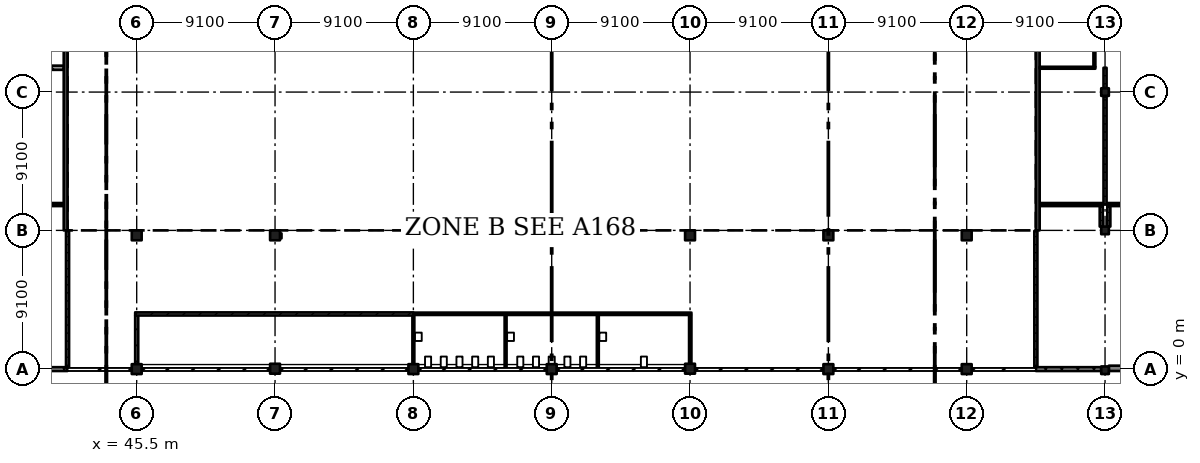
"""IFC4 building model, lengths in metres.
Left out: names, types, materials, properties, quantities, classifications, styles, units other than length and angle.
Written with IfcOpenShell. Run it as: python <this file> out.ifc"""

import sys

from ifc_helpers import new_model, si_unit, direction, frame, frame_2d, origin, origin_2d, place, context, subcontext, project, spatial, rectangle, extrude, element, fill, save


model = new_model("IFC4")
c1 = context("Model", 3, precision=1e-05, world=origin(), true_north=direction((0.0, 1.0)))
c2 = subcontext(c1, "Body", "Model", "MODEL_VIEW")
j1 = project(units=[si_unit("LENGTHUNIT", "METRE"), si_unit("PLANEANGLEUNIT", "RADIAN")], contexts=[c1])
p1 = place(None, origin())
s1 = spatial("IfcSite", under=j1, at=p1, CompositionType="ELEMENT")
p2 = place(p1, origin())
s2 = spatial("IfcBuilding", under=s1, at=p2, CompositionType="ELEMENT")
p3 = place(p2, frame((0.0, 0.0, 24.57)))
s3 = spatial("IfcBuildingStorey", under=s2, at=p3, CompositionType="ELEMENT", Elevation=24.57)
for number, where, z_axis, x_axis in (
    (1, (45.5, -0.025, 0.0), (0.0, 0.0, 1.0), (1.0, 0.0, 0.0)),
    (2, (45.5, 8.775, 0.0), (0.0, 0.0, 1.0), (1.0, 0.0, 0.0)),
    (3, (54.6, 0.0, 0.0), (0.0, 0.0, 1.0), (1.0, 0.0, 0.0)),
    (4, (54.6, 8.775, 0.0), (0.0, 0.0, 1.0), (1.0, 0.0, 0.0)),
    (5, (63.7, -0.025, 0.0), (0.0, 0.0, 1.0), (1.0, 0.0, 0.0)),
    (6, (63.7, 8.775, 0.0), (0.0, 0.0, 1.0), (1.0, 0.0, 0.0)),
    (7, (72.8, -0.025, 0.0), (0.0, 0.0, 1.0), (1.0, 0.0, 0.0)),
    (8, (72.8, 8.775, 0.0), (0.0, 0.0, 1.0), (1.0, 0.0, 0.0)),
    (9, (81.9, 0.0, 0.0), (0.0, 0.0, 1.0), (1.0, 0.0, 0.0)),
    (10, (81.9, 8.775, 0.0), (0.0, 0.0, 1.0), (1.0, 0.0, 0.0)),
    (11, (91.0, -0.025, 0.0), (0.0, 0.0, 1.0), (1.0, 0.0, 0.0)),
    (12, (91.0, 8.775, 0.0), (0.0, 0.0, 1.0), (1.0, 0.0, 0.0)),
    (13, (100.1, -0.025, 0.0), (0.0, 0.0, 1.0), (1.0, 0.0, 0.0)),
    (14, (100.1, 8.775, 0.0), (0.0, 0.0, 1.0), (1.0, 0.0, 0.0)),
):
    element("IfcColumn", number, at=place(p3, frame(where, z_axis=z_axis, x_axis=x_axis)), inside=s3, PredefinedType="COLUMN", context=c2, shape_type="SweptSolid", body=[
        extrude(rectangle(XDim=0.65, YDim=0.65, at=origin_2d()), origin(), (0.0, 0.0, 1.0), 4.55),
    ])
for number, where, z_axis, x_axis in (
    (15, (109.2, -0.1, 0.0), (0.0, 0.0, 1.0), (1.0, 0.0, 0.0)),
    (16, (109.2, 9.1, 0.0), (0.0, 0.0, 1.0), (1.0, 0.0, 0.0)),
    (17, (109.2, 18.2, 0.0), (0.0, 0.0, 1.0), (1.0, 0.0, 0.0)),
):
    element("IfcColumn", number, at=place(p3, frame(where, z_axis=z_axis, x_axis=x_axis)), inside=s3, PredefinedType="COLUMN", context=c2, shape_type="SweptSolid", body=[
        extrude(rectangle(XDim=0.5, YDim=0.5, at=origin_2d()), origin(), (0.0, 0.0, 1.0), 4.55),
    ])
for number, where, z_axis, x_axis in (
    (18, (40.825, 40.95, 0.0), (0.0, 0.0, 1.0), (0.0, -1.0, 0.0)),
    (19, (104.775, 40.95, 0.0), (0.0, 0.0, 1.0), (0.0, -1.0, 0.0)),
):
    element("IfcWall", number, at=place(p3, frame(where, z_axis=z_axis, x_axis=x_axis)), inside=s3, PredefinedType="SHEAR", context=c2, shape_type="SweptSolid", body=[
        extrude(rectangle(XDim=31.85, YDim=0.25, at=frame_2d((15.925, 0.0))), origin(), (0.0, 0.0, 1.0), 4.55),
    ])
for number, where, z_axis, x_axis in (
    (20, (36.65, -0.025, 0.0), (0.0, 0.0, 1.0), (1.0, 0.0, 0.0)),
    (21, (104.65, -0.025, 0.0), (0.0, 0.0, 1.0), (1.0, 0.0, 0.0)),
):
    element("IfcWall", number, at=place(p3, frame(where, z_axis=z_axis, x_axis=x_axis)), inside=s3, PredefinedType="SOLIDWALL", context=c2, shape_type="SweptSolid", body=[
        extrude(rectangle(XDim=4.3, YDim=0.25, at=frame_2d((2.15, 0.0))), origin(), (0.0, 0.0, 1.0), 3.6),
    ])
p4 = place(p3, frame((109.45, 0.025, 0.0), z_axis=(0.0, 0.0, 1.0), x_axis=(1.0, 0.0, 0.0)))
e22 = element("IfcWall", 22, at=p4, inside=s3, PredefinedType="SOLIDWALL", context=c2, shape_type="SweptSolid", body=[
    extrude(rectangle(XDim=8.6, YDim=0.35, at=frame_2d((4.3, 0.0))), origin(), (0.0, 0.0, 1.0), 3.6),
])
p5 = place(p3, frame((36.962, 19.8, 0.0), z_axis=(0.0, 0.0, 1.0), x_axis=(1.0, 0.0, 0.0)))
e23 = element("IfcWall", 23, at=p5, inside=s3, PredefinedType="SOLIDWALL", context=c2, shape_type="SweptSolid", body=[
    extrude(rectangle(XDim=3.738, YDim=0.275, at=frame_2d((1.869, 0.0))), origin(), (0.0, 0.0, 1.0), 4.35),
])
p6 = place(p5, frame((1.25, 0.0, 0.0)))
e24 = element("IfcOpeningElement", 24, at=p6, cuts=e23, PredefinedType="OPENING", context=c2, shape_type="SweptSolid", body=[
    extrude(rectangle(XDim=1.2, YDim=2.4, at=frame_2d((0.6, 1.2))), frame((0.0, 0.147, 0.0), z_axis=(0.0, -1.0, 0.0), x_axis=(1.0, 0.0, 0.0)), (0.0, 0.0, 1.0), 0.295),
])
p7 = place(p3, frame((40.7, 10.8, 0.0), z_axis=(0.0, 0.0, 1.0), x_axis=(-1.0, 0.0, 0.0)))
e25 = element("IfcWall", 25, at=p7, inside=s3, PredefinedType="PARTITIONING", context=c2, shape_type="SweptSolid", body=[
    extrude(rectangle(XDim=4.15, YDim=0.2, at=frame_2d((2.075, 0.0))), origin(), (0.0, 0.0, 1.0), 4.35),
])
p8 = place(p7, frame((1.15, 0.0, 0.0)))
e26 = element("IfcOpeningElement", 26, at=p8, cuts=e25, PredefinedType="OPENING", context=c2, shape_type="SweptSolid", body=[
    extrude(rectangle(XDim=1.8, YDim=2.4, at=frame_2d((0.9, 1.2))), frame((0.0, 0.11, 0.0), z_axis=(0.0, -1.0, 0.0), x_axis=(1.0, 0.0, 0.0)), (0.0, 0.0, 1.0), 0.22),
])
p9 = place(p3, frame((40.95, 0.1, 0.0), z_axis=(0.0, 0.0, 1.0), x_axis=(0.0, 1.0, 0.0)))
e27 = element("IfcWall", 27, at=p9, inside=s3, PredefinedType="PARTITIONING", context=c2, shape_type="SweptSolid", body=[
    extrude(rectangle(XDim=8.97, YDim=0.2, at=frame_2d((4.485, 0.0))), origin(), (0.0, 0.0, 1.0), 3.55),
])
p10 = place(p9, frame((5.02, 0.0, 0.0)))
e28 = element("IfcOpeningElement", 28, at=p10, cuts=e27, PredefinedType="OPENING", context=c2, shape_type="SweptSolid", body=[
    extrude(rectangle(XDim=2.4, YDim=2.4, at=frame_2d((1.2, 1.2))), frame((0.0, 0.11, 0.0), z_axis=(0.0, -1.0, 0.0), x_axis=(1.0, 0.0, 0.0)), (0.0, 0.0, 1.0), 0.22),
])
p11 = place(p9, frame((0.85, 0.0, 0.0)))
e29 = element("IfcOpeningElement", 29, at=p11, cuts=e27, PredefinedType="OPENING", context=c2, shape_type="SweptSolid", body=[
    extrude(rectangle(XDim=2.4, YDim=2.4, at=frame_2d((1.2, 1.2))), frame((0.0, 0.11, 0.0), z_axis=(0.0, -1.0, 0.0), x_axis=(1.0, 0.0, 0.0)), (0.0, 0.0, 1.0), 0.22),
])
p12 = place(p3, frame((45.5, 3.5, 0.0), z_axis=(0.0, 0.0, 1.0), x_axis=(0.0, -1.0, 0.0)))
e30 = element("IfcWall", 30, at=p12, inside=s3, PredefinedType="PARTITIONING", context=c2, shape_type="SweptSolid", body=[
    extrude(rectangle(XDim=3.2, YDim=0.2, at=frame_2d((1.6, 0.0))), origin(), (0.0, 0.0, 1.0), 3.9),
])
for number, where, z_axis, x_axis in (
    (31, (54.925, 8.575, 0.0), (0.0, 0.0, 1.0), (0.0, 1.0, 0.0)),
    (32, (63.375, 8.875, 0.0), (0.0, 0.0, 1.0), (0.0, -1.0, 0.0)),
):
    element("IfcWall", number, at=place(p3, frame(where, z_axis=z_axis, x_axis=x_axis)), inside=s3, PredefinedType="PARTITIONING", context=c2, shape_type="SweptSolid", body=[
        extrude(rectangle(XDim=0.325, YDim=0.2, at=frame_2d((0.163, 0.0))), origin(), (0.0, 0.0, 1.0), 8.43),
    ])
p13 = place(p3, frame((63.7, 3.5, 0.0), z_axis=(0.0, 0.0, 1.0), x_axis=(0.0, -1.0, 0.0)))
e33 = element("IfcWall", 33, at=p13, inside=s3, PredefinedType="PARTITIONING", context=c2, shape_type="SweptSolid", body=[
    extrude(rectangle(XDim=3.2, YDim=0.125, at=frame_2d((1.6, 0.0))), origin(), (0.0, 0.0, 1.0), 3.9),
])
p14 = place(p3, frame((63.7, 3.6, 0.0), z_axis=(0.0, 0.0, 1.0), x_axis=(-1.0, 0.0, 0.0)))
e34 = element("IfcWall", 34, at=p14, inside=s3, PredefinedType="PARTITIONING", context=c2, shape_type="SweptSolid", body=[
    extrude(rectangle(XDim=18.3, YDim=0.2, at=frame_2d((9.15, 0.0))), origin(), (0.0, 0.0, 1.0), 3.9),
])
p15 = place(p14, frame((8.25, 0.0, 0.0)))
e35 = element("IfcOpeningElement", 35, at=p15, cuts=e34, PredefinedType="OPENING", context=c2, shape_type="SweptSolid", body=[
    extrude(rectangle(XDim=1.8, YDim=2.1, at=frame_2d((0.9, 1.05))), frame((0.0, 0.11, 0.0), z_axis=(0.0, -1.0, 0.0), x_axis=(1.0, 0.0, 0.0)), (0.0, 0.0, 1.0), 0.22),
])
p16 = place(p3, frame((69.767, 3.538, 0.0), z_axis=(0.0, 0.0, 1.0), x_axis=(0.0, -1.0, 0.0)))
e36 = element("IfcWall", 36, at=p16, inside=s3, PredefinedType="PARTITIONING", context=c2, shape_type="SweptSolid", body=[
    extrude(rectangle(XDim=3.508, YDim=0.125, at=frame_2d((1.754, 0.0))), origin(), (0.0, 0.0, 1.0), 3.9),
])
p17 = place(p3, frame((63.7, 3.6, 0.0), z_axis=(0.0, 0.0, 1.0), x_axis=(1.0, 0.0, 0.0)))
e37 = element("IfcWall", 37, at=p17, inside=s3, PredefinedType="PARTITIONING", context=c2, shape_type="SweptSolid", body=[
    extrude(rectangle(XDim=18.262, YDim=0.125, at=frame_2d((9.131, 0.0))), origin(), (0.0, 0.0, 1.0), 3.9),
])
p18 = place(p17, frame((2.617, 0.0, 0.0)))
e38 = element("IfcOpeningElement", 38, at=p18, cuts=e37, PredefinedType="OPENING", context=c2, shape_type="SweptSolid", body=[
    extrude(rectangle(XDim=0.9, YDim=2.1, at=frame_2d((0.45, 1.05))), frame((0.0, 0.073, 0.0), z_axis=(0.0, -1.0, 0.0), x_axis=(1.0, 0.0, 0.0)), (0.0, 0.0, 1.0), 0.145),
])
p19 = place(p17, frame((8.683, 0.0, 0.0)))
e39 = element("IfcOpeningElement", 39, at=p19, cuts=e37, PredefinedType="OPENING", context=c2, shape_type="SweptSolid", body=[
    extrude(rectangle(XDim=0.9, YDim=2.1, at=frame_2d((0.45, 1.05))), frame((0.0, 0.073, 0.0), z_axis=(0.0, -1.0, 0.0), x_axis=(1.0, 0.0, 0.0)), (0.0, 0.0, 1.0), 0.145),
])
p20 = place(p17, frame((14.712, 0.0, 0.0)))
e40 = element("IfcOpeningElement", 40, at=p20, cuts=e37, PredefinedType="OPENING", context=c2, shape_type="SweptSolid", body=[
    extrude(rectangle(XDim=1.0, YDim=2.1, at=frame_2d((0.5, 1.05))), frame((0.0, 0.073, 0.0), z_axis=(0.0, -1.0, 0.0), x_axis=(1.0, 0.0, 0.0)), (0.0, 0.0, 1.0), 0.145),
])
p21 = place(p3, frame((75.833, 3.538, 0.0), z_axis=(0.0, 0.0, 1.0), x_axis=(0.0, -1.0, 0.0)))
e41 = element("IfcWall", 41, at=p21, inside=s3, PredefinedType="PARTITIONING", context=c2, shape_type="SweptSolid", body=[
    extrude(rectangle(XDim=3.508, YDim=0.125, at=frame_2d((1.754, 0.0))), origin(), (0.0, 0.0, 1.0), 3.9),
])
p22 = place(p3, frame((81.9, 0.325, 0.0), z_axis=(0.0, 0.0, 1.0), x_axis=(0.0, 1.0, 0.0)))
e42 = element("IfcWall", 42, at=p22, inside=s3, PredefinedType="PARTITIONING", context=c2, shape_type="SweptSolid", body=[
    extrude(rectangle(XDim=3.213, YDim=0.125, at=frame_2d((1.606, 0.0))), origin(), (0.0, 0.0, 1.0), 3.9),
])
p23 = place(p3, frame((104.65, 0.1, 0.0), z_axis=(0.0, 0.0, 1.0), x_axis=(0.0, 1.0, 0.0)))
e43 = element("IfcWall", 43, at=p23, inside=s3, PredefinedType="PARTITIONING", context=c2, shape_type="SweptSolid", body=[
    extrude(rectangle(XDim=8.97, YDim=0.2, at=frame_2d((4.485, 0.0))), origin(), (0.0, 0.0, 1.0), 3.55),
])
p24 = place(p23, frame((5.05, 0.0, 0.0)))
e44 = element("IfcOpeningElement", 44, at=p24, cuts=e43, PredefinedType="OPENING", context=c2, shape_type="SweptSolid", body=[
    extrude(rectangle(XDim=2.4, YDim=2.4, at=frame_2d((1.2, 1.2))), frame((0.0, 0.11, 0.0), z_axis=(0.0, -1.0, 0.0), x_axis=(1.0, 0.0, 0.0)), (0.0, 0.0, 1.0), 0.22),
])
p25 = place(p23, frame((0.85, 0.0, 0.0)))
e45 = element("IfcOpeningElement", 45, at=p25, cuts=e43, PredefinedType="OPENING", context=c2, shape_type="SweptSolid", body=[
    extrude(rectangle(XDim=2.4, YDim=2.4, at=frame_2d((1.2, 1.2))), frame((0.0, 0.11, 0.0), z_axis=(0.0, -1.0, 0.0), x_axis=(1.0, 0.0, 0.0)), (0.0, 0.0, 1.0), 0.22),
])
p26 = place(p3, frame((104.9, 19.8, 0.0), z_axis=(0.0, 0.0, 1.0), x_axis=(1.0, 0.0, 0.0)))
e46 = element("IfcWall", 46, at=p26, inside=s3, PredefinedType="PARTITIONING", context=c2, shape_type="SweptSolid", body=[
    extrude(rectangle(XDim=3.663, YDim=0.125, at=frame_2d((1.831, 0.0))), origin(), (0.0, 0.0, 1.0), 4.35),
])
p27 = place(p26, frame((1.35, 0.0, 0.0)))
e47 = element("IfcOpeningElement", 47, at=p27, cuts=e46, PredefinedType="OPENING", context=c2, shape_type="SweptSolid", body=[
    extrude(rectangle(XDim=0.9, YDim=2.1, at=frame_2d((0.45, 1.05))), frame((0.0, 0.073, 0.0), z_axis=(0.0, -1.0, 0.0), x_axis=(1.0, 0.0, 0.0)), (0.0, 0.0, 1.0), 0.145),
])
p28 = place(p3, frame((108.5, 19.863, 0.0), z_axis=(0.0, 0.0, 1.0), x_axis=(0.0, 1.0, 0.0)))
e48 = element("IfcWall", 48, at=p28, inside=s3, PredefinedType="PARTITIONING", context=c2, shape_type="SweptSolid", body=[
    extrude(rectangle(XDim=7.125, YDim=0.125, at=frame_2d((3.562, 0.0))), origin(), (0.0, 0.0, 1.0), 4.35),
])
p29 = place(p3, frame((108.95, 9.35, 0.0), z_axis=(0.0, 0.0, 1.0), x_axis=(0.0, 1.0, 0.0)))
e49 = element("IfcWall", 49, at=p29, inside=s3, PredefinedType="PARTITIONING", context=c2, shape_type="SweptSolid", body=[
    extrude(rectangle(XDim=1.35, YDim=0.2, at=frame_2d((0.675, 0.0))), origin(), (0.0, 0.0, 1.0), 4.35),
])
p30 = place(p3, frame((109.05, 10.8, 0.0), z_axis=(0.0, 0.0, 1.0), x_axis=(-1.0, 0.0, 0.0)))
e50 = element("IfcWall", 50, at=p30, inside=s3, PredefinedType="PARTITIONING", context=c2, shape_type="SweptSolid", body=[
    extrude(rectangle(XDim=4.15, YDim=0.2, at=frame_2d((2.075, 0.0))), origin(), (0.0, 0.0, 1.0), 4.35),
])
p31 = place(p30, frame((1.15, 0.0, 0.0)))
e51 = element("IfcOpeningElement", 51, at=p31, cuts=e50, PredefinedType="OPENING", context=c2, shape_type="SweptSolid", body=[
    extrude(rectangle(XDim=1.8, YDim=2.4, at=frame_2d((0.9, 1.2))), frame((0.0, 0.11, 0.0), z_axis=(0.0, -1.0, 0.0), x_axis=(1.0, 0.0, 0.0)), (0.0, 0.0, 1.0), 0.22),
])
p32 = place(p3, frame((109.2, 10.8, 0.0), z_axis=(0.0, 0.0, 1.0), x_axis=(0.0, 1.0, 0.0)))
e52 = element("IfcWall", 52, at=p32, inside=s3, PredefinedType="PARTITIONING", context=c2, shape_type="SweptSolid", body=[
    extrude(rectangle(XDim=7.15, YDim=0.2, at=frame_2d((3.575, 0.0))), origin(), (0.0, 0.0, 1.0), 3.6),
])
p33 = place(p32, frame((0.85, 0.0, 0.0)))
e53 = element("IfcOpeningElement", 53, at=p33, cuts=e52, PredefinedType="OPENING", context=c2, shape_type="SweptSolid", body=[
    extrude(rectangle(XDim=1.8, YDim=2.4, at=frame_2d((0.9, 1.2))), frame((0.0, 0.11, 0.0), z_axis=(0.0, -1.0, 0.0), x_axis=(1.0, 0.0, 0.0)), (0.0, 0.0, 1.0), 0.22),
])
p34 = place(p32, frame((4.45, 0.0, 0.0)))
e54 = element("IfcOpeningElement", 54, at=p34, cuts=e52, PredefinedType="OPENING", context=c2, shape_type="SweptSolid", body=[
    extrude(rectangle(XDim=1.8, YDim=2.4, at=frame_2d((0.9, 1.2))), frame((0.0, 0.11, 0.0), z_axis=(0.0, -1.0, 0.0), x_axis=(1.0, 0.0, 0.0)), (0.0, 0.0, 1.0), 0.22),
])
p35 = place(p3, frame((109.2, 18.45, 0.0), z_axis=(0.0, 0.0, 1.0), x_axis=(0.0, 1.0, 0.0)))
e55 = element("IfcWall", 55, at=p35, inside=s3, PredefinedType="PARTITIONING", context=c2, shape_type="SweptSolid", body=[
    extrude(rectangle(XDim=1.35, YDim=0.2, at=frame_2d((0.675, 0.0))), origin(), (0.0, 0.0, 1.0), 3.6),
])
p36 = place(p3, frame((109.45, 10.7, 0.0), z_axis=(0.0, 0.0, 1.0), x_axis=(0.0, -1.0, 0.0)))
e56 = element("IfcWall", 56, at=p36, inside=s3, PredefinedType="PARTITIONING", context=c2, shape_type="SweptSolid", body=[
    extrude(rectangle(XDim=1.35, YDim=0.2, at=frame_2d((0.675, 0.0))), origin(), (0.0, 0.0, 1.0), 4.35),
])
p37 = place(p3, frame((112.17, 10.8, 0.0), z_axis=(0.0, 0.0, 1.0), x_axis=(-1.0, 0.0, 0.0)))
e57 = element("IfcWall", 57, at=p37, inside=s3, PredefinedType="PARTITIONING", context=c2, shape_type="SweptSolid", body=[
    extrude(rectangle(XDim=2.82, YDim=0.2, at=frame_2d((1.41, 0.0))), origin(), (0.0, 0.0, 1.0), 4.35),
])
p38 = place(p37, frame((0.55, 0.0, 0.0)))
e58 = element("IfcOpeningElement", 58, at=p38, cuts=e57, PredefinedType="OPENING", context=c2, shape_type="SweptSolid", body=[
    extrude(rectangle(XDim=1.8, YDim=2.4, at=frame_2d((0.9, 1.2))), frame((0.0, 0.11, 0.0), z_axis=(0.0, -1.0, 0.0), x_axis=(1.0, 0.0, 0.0)), (0.0, 0.0, 1.0), 0.22),
])
p39 = place(p27, origin())
e59 = element("IfcDoor", 59, at=p39, inside=s3, OperationType="SINGLE_SWING_RIGHT", PredefinedType="DOOR", context=c2, shape_type="SweptSolid", body=[
    extrude(rectangle(XDim=0.9, YDim=2.1, at=frame_2d((0.45, 1.05))), frame((0.0, 0.025, 0.0), z_axis=(0.0, -1.0, 0.0), x_axis=(1.0, 0.0, 0.0)), (0.0, 0.0, 1.0), 0.05),
])
fill(e47, e59)
p40 = place(p15, origin())
e60 = element("IfcDoor", 60, at=p40, inside=s3, OperationType="DOUBLE_DOOR_SINGLE_SWING", PredefinedType="DOOR", context=c2, shape_type="SweptSolid", body=[
    extrude(rectangle(XDim=1.8, YDim=2.1, at=frame_2d((0.9, 1.05))), frame((0.0, 0.025, 0.0), z_axis=(0.0, -1.0, 0.0), x_axis=(1.0, 0.0, 0.0)), (0.0, 0.0, 1.0), 0.05),
])
fill(e35, e60)
p41 = place(p18, origin())
e61 = element("IfcDoor", 61, at=p41, inside=s3, OperationType="SINGLE_SWING_RIGHT", PredefinedType="DOOR", context=c2, shape_type="SweptSolid", body=[
    extrude(rectangle(XDim=0.9, YDim=2.1, at=frame_2d((0.45, 1.05))), frame((0.0, 0.025, 0.0), z_axis=(0.0, -1.0, 0.0), x_axis=(1.0, 0.0, 0.0)), (0.0, 0.0, 1.0), 0.05),
])
fill(e38, e61)
p42 = place(p19, origin())
e62 = element("IfcDoor", 62, at=p42, inside=s3, OperationType="SINGLE_SWING_RIGHT", PredefinedType="DOOR", context=c2, shape_type="SweptSolid", body=[
    extrude(rectangle(XDim=0.9, YDim=2.1, at=frame_2d((0.45, 1.05))), frame((0.0, 0.025, 0.0), z_axis=(0.0, -1.0, 0.0), x_axis=(1.0, 0.0, 0.0)), (0.0, 0.0, 1.0), 0.05),
])
fill(e39, e62)
p43 = place(p20, origin())
e63 = element("IfcDoor", 63, at=p43, inside=s3, OperationType="SINGLE_SWING_RIGHT", PredefinedType="DOOR", context=c2, shape_type="SweptSolid", body=[
    extrude(rectangle(XDim=1.0, YDim=2.1, at=frame_2d((0.5, 1.05))), frame((0.0, 0.025, 0.0), z_axis=(0.0, -1.0, 0.0), x_axis=(1.0, 0.0, 0.0)), (0.0, 0.0, 1.0), 0.05),
])
fill(e40, e63)
p44 = place(p10, origin())
e64 = element("IfcDoor", 64, at=p44, inside=s3, OperationType="DOUBLE_DOOR_SINGLE_SWING", PredefinedType="DOOR", context=c2, shape_type="SweptSolid", body=[
    extrude(rectangle(XDim=2.4, YDim=2.4, at=frame_2d((1.2, 1.2))), frame((0.0, 0.025, 0.0), z_axis=(0.0, -1.0, 0.0), x_axis=(1.0, 0.0, 0.0)), (0.0, 0.0, 1.0), 0.05),
])
fill(e28, e64)
p45 = place(p11, origin())
e65 = element("IfcDoor", 65, at=p45, inside=s3, OperationType="DOUBLE_DOOR_SINGLE_SWING", PredefinedType="DOOR", context=c2, shape_type="SweptSolid", body=[
    extrude(rectangle(XDim=2.4, YDim=2.4, at=frame_2d((1.2, 1.2))), frame((0.0, 0.025, 0.0), z_axis=(0.0, -1.0, 0.0), x_axis=(1.0, 0.0, 0.0)), (0.0, 0.0, 1.0), 0.05),
])
fill(e29, e65)
p46 = place(p33, origin())
e66 = element("IfcDoor", 66, at=p46, inside=s3, OperationType="DOUBLE_DOOR_SINGLE_SWING", PredefinedType="DOOR", context=c2, shape_type="SweptSolid", body=[
    extrude(rectangle(XDim=1.8, YDim=2.4, at=frame_2d((0.9, 1.2))), frame((0.0, 0.025, 0.0), z_axis=(0.0, -1.0, 0.0), x_axis=(1.0, 0.0, 0.0)), (0.0, 0.0, 1.0), 0.05),
])
fill(e53, e66)
p47 = place(p34, origin())
e67 = element("IfcDoor", 67, at=p47, inside=s3, OperationType="DOUBLE_DOOR_SINGLE_SWING", PredefinedType="DOOR", context=c2, shape_type="SweptSolid", body=[
    extrude(rectangle(XDim=1.8, YDim=2.4, at=frame_2d((0.9, 1.2))), frame((0.0, 0.025, 0.0), z_axis=(0.0, -1.0, 0.0), x_axis=(1.0, 0.0, 0.0)), (0.0, 0.0, 1.0), 0.05),
])
fill(e54, e67)
p48 = place(p38, origin())
e68 = element("IfcDoor", 68, at=p48, inside=s3, OperationType="DOUBLE_DOOR_SINGLE_SWING", PredefinedType="DOOR", context=c2, shape_type="SweptSolid", body=[
    extrude(rectangle(XDim=1.8, YDim=2.4, at=frame_2d((0.9, 1.2))), frame((0.0, 0.025, 0.0), z_axis=(0.0, -1.0, 0.0), x_axis=(1.0, 0.0, 0.0)), (0.0, 0.0, 1.0), 0.05),
])
fill(e58, e68)
p49 = place(p31, origin())
e69 = element("IfcDoor", 69, at=p49, inside=s3, OperationType="DOUBLE_DOOR_SINGLE_SWING", PredefinedType="DOOR", context=c2, shape_type="SweptSolid", body=[
    extrude(rectangle(XDim=1.8, YDim=2.4, at=frame_2d((0.9, 1.2))), frame((0.0, 0.025, 0.0), z_axis=(0.0, -1.0, 0.0), x_axis=(1.0, 0.0, 0.0)), (0.0, 0.0, 1.0), 0.05),
])
fill(e51, e69)
p50 = place(p24, origin())
e70 = element("IfcDoor", 70, at=p50, inside=s3, OperationType="DOUBLE_DOOR_SINGLE_SWING", PredefinedType="DOOR", context=c2, shape_type="SweptSolid", body=[
    extrude(rectangle(XDim=2.4, YDim=2.4, at=frame_2d((1.2, 1.2))), frame((0.0, 0.025, 0.0), z_axis=(0.0, -1.0, 0.0), x_axis=(1.0, 0.0, 0.0)), (0.0, 0.0, 1.0), 0.05),
])
fill(e44, e70)
p51 = place(p25, origin())
e71 = element("IfcDoor", 71, at=p51, inside=s3, OperationType="DOUBLE_DOOR_SINGLE_SWING", PredefinedType="DOOR", context=c2, shape_type="SweptSolid", body=[
    extrude(rectangle(XDim=2.4, YDim=2.4, at=frame_2d((1.2, 1.2))), frame((0.0, 0.025, 0.0), z_axis=(0.0, -1.0, 0.0), x_axis=(1.0, 0.0, 0.0)), (0.0, 0.0, 1.0), 0.05),
])
fill(e45, e71)
save(model, sys.argv[1])
